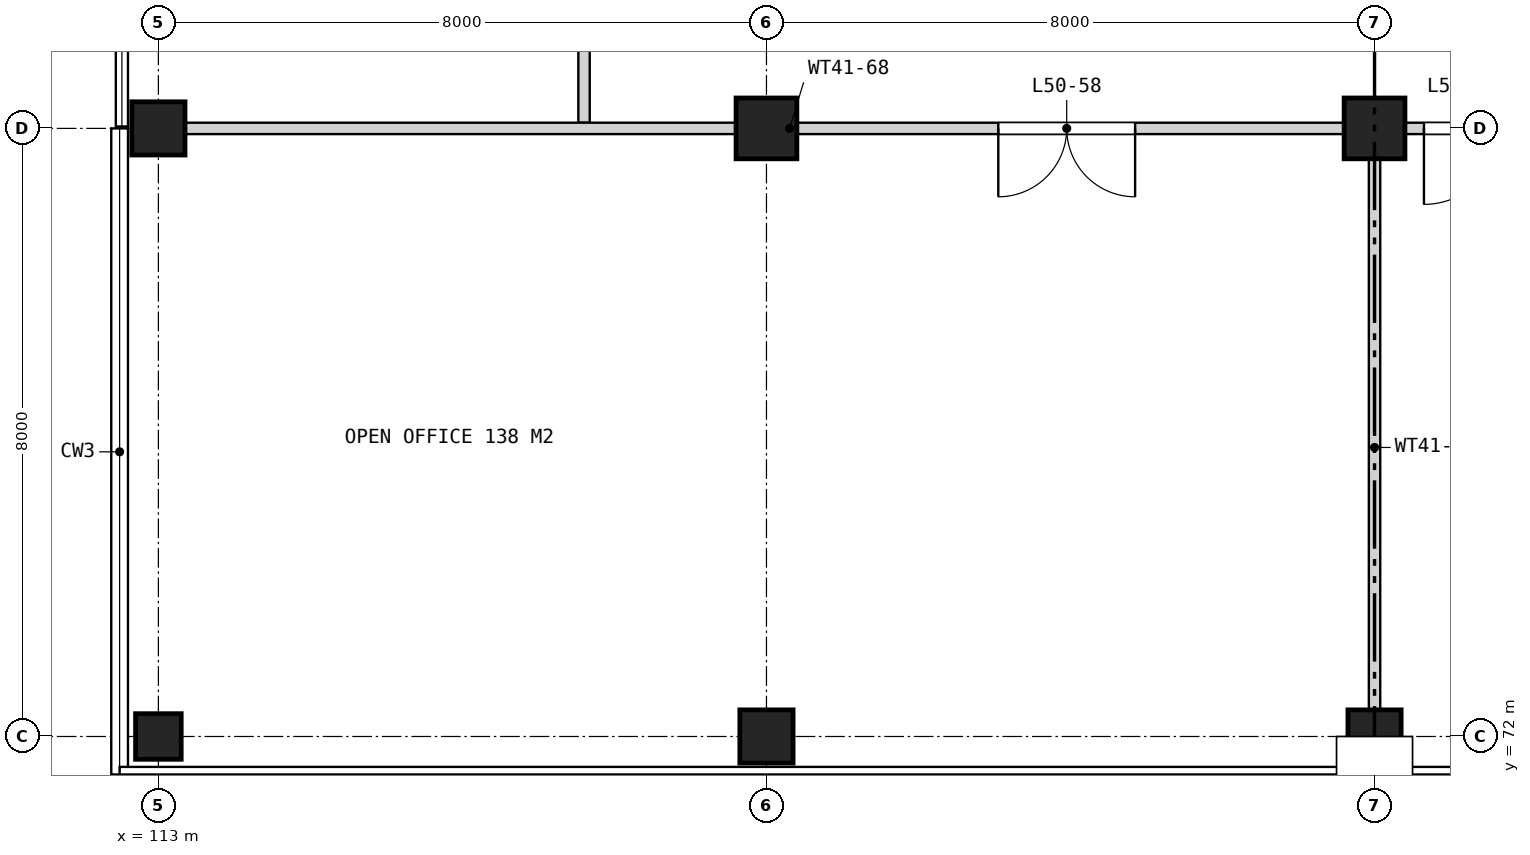
"""IFC4 building model, lengths in metres.
Left out: names, types, materials, properties, quantities, classifications, styles, units other than length and angle.
Written with IfcOpenShell. Run it as: python <this file> out.ifc"""

import sys

from ifc_helpers import new_model, si_unit, direction, frame, frame_2d, origin, origin_2d, place, context, subcontext, project, spatial, rectangle, extrude, element, fill, save


model = new_model("IFC4")
c1 = context("Model", 3, precision=1e-05, world=origin(), true_north=direction((0.0, 1.0)))
c2 = subcontext(c1, "Body", "Model", "MODEL_VIEW")
j1 = project(units=[si_unit("LENGTHUNIT", "METRE"), si_unit("PLANEANGLEUNIT", "RADIAN")], contexts=[c1])
p1 = place(None, origin())
s1 = spatial("IfcSite", under=j1, at=p1, CompositionType="ELEMENT")
p2 = place(p1, origin())
s2 = spatial("IfcBuilding", under=s1, at=p2, CompositionType="ELEMENT")
p3 = place(p2, frame((0.0, 0.0, 233.5)))
s3 = spatial("IfcBuildingStorey", under=s2, at=p3, CompositionType="ELEMENT", Elevation=233.5)
p4 = place(p3, frame((113.0, 72.0, 0.0), z_axis=(0.0, 0.0, 1.0), x_axis=(1.0, 0.0, 0.0)))
e1 = element("IfcColumn", 1, at=p4, inside=s3, PredefinedType="COLUMN", context=c2, shape_type="SweptSolid", body=[
    extrude(rectangle(XDim=0.6, YDim=0.6, at=origin_2d()), origin(), (0.0, 0.0, 1.0), 4.2),
])
for number, where, z_axis, x_axis in (
    (2, (113.0, 80.0, 0.0), (0.0, 0.0, 1.0), (1.0, 0.0, 0.0)),
    (3, (121.0, 72.0, 0.0), (0.0, 0.0, 1.0), (1.0, 0.0, 0.0)),
):
    element("IfcColumn", number, at=place(p3, frame(where, z_axis=z_axis, x_axis=x_axis)), inside=s3, PredefinedType="COLUMN", context=c2, shape_type="SweptSolid", body=[
        extrude(rectangle(XDim=0.7, YDim=0.7, at=origin_2d()), origin(), (0.0, 0.0, 1.0), 4.2),
    ])
p5 = place(p3, frame((121.0, 80.0, 0.0), z_axis=(0.0, 0.0, 1.0), x_axis=(1.0, 0.0, 0.0)))
e4 = element("IfcColumn", 4, at=p5, inside=s3, PredefinedType="COLUMN", context=c2, shape_type="SweptSolid", body=[
    extrude(rectangle(XDim=0.8, YDim=0.8, at=origin_2d()), origin(), (0.0, 0.0, 1.0), 4.2),
])
p6 = place(p3, frame((129.0, 72.0, 0.0), z_axis=(0.0, 0.0, 1.0), x_axis=(1.0, 0.0, 0.0)))
e5 = element("IfcColumn", 5, at=p6, inside=s3, PredefinedType="COLUMN", context=c2, shape_type="SweptSolid", body=[
    extrude(rectangle(XDim=0.7, YDim=0.7, at=origin_2d()), origin(), (0.0, 0.0, 1.0), 4.2),
])
p7 = place(p3, frame((129.0, 80.0, 0.0), z_axis=(0.0, 0.0, 1.0), x_axis=(1.0, 0.0, 0.0)))
e6 = element("IfcColumn", 6, at=p7, inside=s3, PredefinedType="COLUMN", context=c2, shape_type="SweptSolid", body=[
    extrude(rectangle(XDim=0.8, YDim=0.8, at=origin_2d()), origin(), (0.0, 0.0, 1.0), 4.2),
])
p8 = place(p3, frame((118.6, 80.075, 0.0), z_axis=(0.0, 0.0, 1.0), x_axis=(0.0, 1.0, 0.0)))
e7 = element("IfcWall", 7, at=p8, inside=s3, PredefinedType="PARTITIONING", context=c2, shape_type="SweptSolid", body=[
    extrude(rectangle(XDim=13.925, YDim=0.15, at=frame_2d((6.962, 0.0))), origin(), (0.0, 0.0, 1.0), 3.255),
])
p9 = place(p8, frame((6.45, 0.0, 0.0)))
e8 = element("IfcOpeningElement", 8, at=p9, cuts=e7, PredefinedType="OPENING", context=c2, shape_type="SweptSolid", body=[
    extrude(rectangle(XDim=1.0, YDim=2.1, at=frame_2d((0.5, 1.05))), frame((0.0, 0.085, 0.0), z_axis=(0.0, -1.0, 0.0), x_axis=(1.0, 0.0, 0.0)), (0.0, 0.0, 1.0), 0.17),
])
p10 = place(p3, frame((129.0, 71.68, 0.0), z_axis=(0.0, 0.0, 1.0), x_axis=(0.0, 1.0, 0.0)))
e9 = element("IfcWall", 9, at=p10, inside=s3, PredefinedType="PARTITIONING", context=c2, shape_type="SweptSolid", body=[
    extrude(rectangle(XDim=8.245, YDim=0.15, at=frame_2d((4.123, 0.0))), origin(), (0.0, 0.0, 1.0), 3.255),
])
p11 = place(p3, frame((112.68, 80.0, 0.0), z_axis=(0.0, 0.0, 1.0), x_axis=(1.0, 0.0, 0.0)))
e10 = element("IfcWall", 10, at=p11, inside=s3, PredefinedType="PARTITIONING", context=c2, shape_type="SweptSolid", body=[
    extrude(rectangle(XDim=24.64, YDim=0.15, at=frame_2d((12.32, 0.0))), origin(), (0.0, 0.0, 1.0), 3.255),
])
p12 = place(p11, frame((11.37, 0.0, 0.0)))
e11 = element("IfcOpeningElement", 11, at=p12, cuts=e10, PredefinedType="OPENING", context=c2, shape_type="SweptSolid", body=[
    extrude(rectangle(XDim=1.8, YDim=2.1, at=frame_2d((0.9, 1.05))), frame((0.0, 0.085, 0.0), z_axis=(0.0, -1.0, 0.0), x_axis=(1.0, 0.0, 0.0)), (0.0, 0.0, 1.0), 0.17),
])
p13 = place(p11, frame((16.97, 0.0, 0.0)))
e12 = element("IfcOpeningElement", 12, at=p13, cuts=e10, PredefinedType="OPENING", context=c2, shape_type="SweptSolid", body=[
    extrude(rectangle(XDim=1.0, YDim=2.1, at=frame_2d((0.5, 1.05))), frame((0.0, 0.085, 0.0), z_axis=(0.0, -1.0, 0.0), x_axis=(1.0, 0.0, 0.0)), (0.0, 0.0, 1.0), 0.17),
])
p14 = place(p12, frame((1.8, 0.0, 0.0), z_axis=(0.0, 0.0, 1.0), x_axis=(-1.0, 0.0, 0.0)))
e13 = element("IfcDoor", 13, at=p14, inside=s3, OperationType="DOUBLE_DOOR_SINGLE_SWING", PredefinedType="DOOR", context=c2, shape_type="SweptSolid", body=[
    extrude(rectangle(XDim=1.8, YDim=2.1, at=frame_2d((0.9, 1.05))), frame((0.0, 0.025, 0.0), z_axis=(0.0, -1.0, 0.0), x_axis=(1.0, 0.0, 0.0)), (0.0, 0.0, 1.0), 0.05),
])
fill(e11, e13)
p15 = place(p13, frame((1.0, 0.0, 0.0), z_axis=(0.0, 0.0, 1.0), x_axis=(-1.0, 0.0, 0.0)))
e14 = element("IfcDoor", 14, at=p15, inside=s3, OperationType="SINGLE_SWING_RIGHT", PredefinedType="DOOR", context=c2, shape_type="SweptSolid", body=[
    extrude(rectangle(XDim=1.0, YDim=2.1, at=frame_2d((0.5, 1.05))), frame((0.0, 0.025, 0.0), z_axis=(0.0, -1.0, 0.0), x_axis=(1.0, 0.0, 0.0)), (0.0, 0.0, 1.0), 0.05),
])
fill(e12, e14)
save(model, sys.argv[1])
